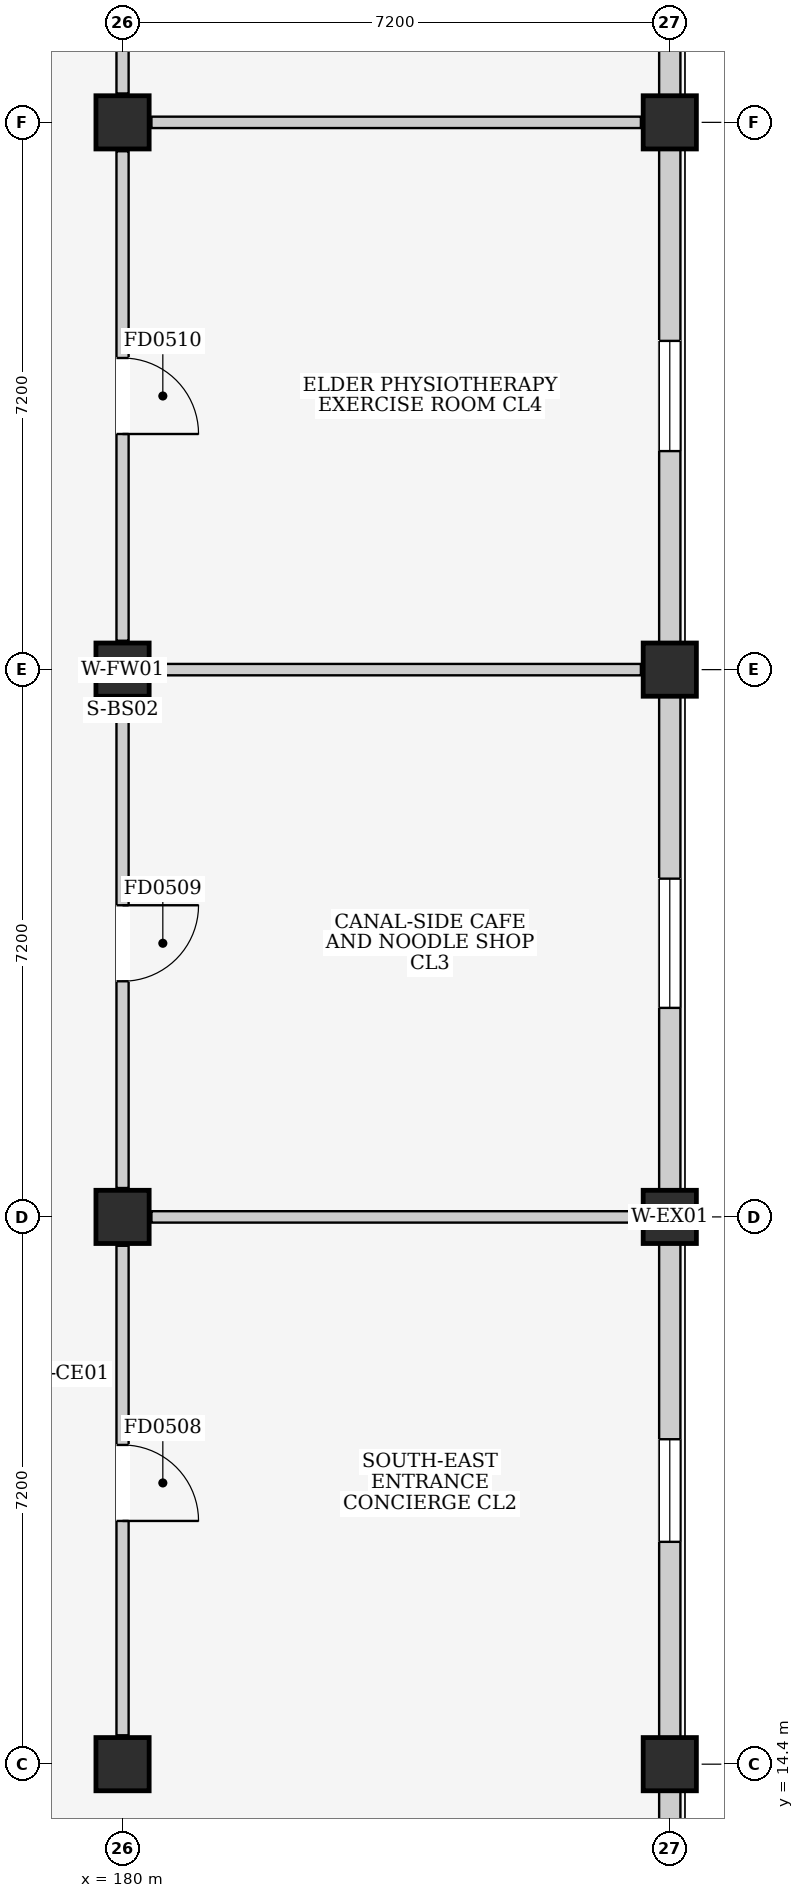
"""IFC4 building model, lengths in metres.
Left out: names, types, materials, properties, quantities, classifications, styles, units other than length and angle.
Written with IfcOpenShell. Run it as: python <this file> out.ifc"""

import sys

from ifc_helpers import new_model, si_unit, direction, frame, frame_2d, origin, origin_2d, place, context, subcontext, project, spatial, rectangle, extrude, element, fill, save


model = new_model("IFC4")
c1 = context("Model", 3, precision=1e-05, world=origin(), true_north=direction((0.0, 1.0)))
c2 = subcontext(c1, "Body", "Model", "MODEL_VIEW")
j1 = project(units=[si_unit("LENGTHUNIT", "METRE"), si_unit("PLANEANGLEUNIT", "RADIAN")], contexts=[c1])
p1 = place(None, origin())
s1 = spatial("IfcSite", under=j1, at=p1, CompositionType="ELEMENT")
p2 = place(p1, origin())
s2 = spatial("IfcBuilding", under=s1, at=p2, CompositionType="ELEMENT")
p3 = place(p2, origin())
s3 = spatial("IfcBuildingStorey", under=s2, at=p3, CompositionType="ELEMENT", Elevation=0.0)
for number, where, z_axis, x_axis in (
    (1, (180.0, 14.4, 0.0), (0.0, 0.0, 1.0), (1.0, 0.0, 0.0)),
    (2, (180.0, 21.6, 0.0), (0.0, 0.0, 1.0), (1.0, 0.0, 0.0)),
    (3, (180.0, 28.8, 0.0), (0.0, 0.0, 1.0), (1.0, 0.0, 0.0)),
    (4, (180.0, 36.0, 0.0), (0.0, 0.0, 1.0), (1.0, 0.0, 0.0)),
    (5, (187.2, 14.4, 0.0), (0.0, 0.0, 1.0), (1.0, 0.0, 0.0)),
    (6, (187.2, 21.6, 0.0), (0.0, 0.0, 1.0), (1.0, 0.0, 0.0)),
    (7, (187.2, 28.8, 0.0), (0.0, 0.0, 1.0), (1.0, 0.0, 0.0)),
    (8, (187.2, 36.0, 0.0), (0.0, 0.0, 1.0), (1.0, 0.0, 0.0)),
):
    element("IfcColumn", number, at=place(p3, frame(where, z_axis=z_axis, x_axis=x_axis)), inside=s3, PredefinedType="COLUMN", context=c2, shape_type="SweptSolid", body=[
        extrude(rectangle(XDim=0.7, YDim=0.7, at=origin_2d()), origin(), (0.0, 0.0, 1.0), 4.5),
    ])
p4 = place(p3, frame((187.2, 7.55, 0.0), z_axis=(0.0, 0.0, 1.0), x_axis=(0.0, 1.0, 0.0)))
e9 = element("IfcWall", 9, at=p4, inside=s3, PredefinedType="ELEMENTEDWALL", context=c2, shape_type="SweptSolid", body=[
    extrude(rectangle(XDim=6.5, YDim=0.28, at=frame_2d((3.25, 0.0))), origin(), (0.0, 0.0, 1.0), 3.665),
])
p5 = place(p4, frame((2.55, 0.0, 0.95)))
e10 = element("IfcOpeningElement", 10, at=p5, cuts=e9, PredefinedType="OPENING", context=c2, shape_type="SweptSolid", body=[
    extrude(rectangle(XDim=1.4, YDim=1.2, at=frame_2d((0.7, 0.6))), frame((0.0, 0.155, 0.0), z_axis=(0.0, -1.0, 0.0), x_axis=(1.0, 0.0, 0.0)), (0.0, 0.0, 1.0), 0.31),
])
p6 = place(p3, frame((187.2, 14.75, 0.0), z_axis=(0.0, 0.0, 1.0), x_axis=(0.0, 1.0, 0.0)))
e11 = element("IfcWall", 11, at=p6, inside=s3, PredefinedType="ELEMENTEDWALL", context=c2, shape_type="SweptSolid", body=[
    extrude(rectangle(XDim=6.5, YDim=0.28, at=frame_2d((3.25, 0.0))), origin(), (0.0, 0.0, 1.0), 3.665),
])
p7 = place(p6, frame((2.575, 0.0, 0.95)))
e12 = element("IfcOpeningElement", 12, at=p7, cuts=e11, PredefinedType="OPENING", context=c2, shape_type="SweptSolid", body=[
    extrude(rectangle(XDim=1.35, YDim=1.5, at=frame_2d((0.675, 0.75))), frame((0.0, 0.155, 0.0), z_axis=(0.0, -1.0, 0.0), x_axis=(1.0, 0.0, 0.0)), (0.0, 0.0, 1.0), 0.31),
])
p8 = place(p3, frame((187.2, 21.95, 0.0), z_axis=(0.0, 0.0, 1.0), x_axis=(0.0, 1.0, 0.0)))
e13 = element("IfcWall", 13, at=p8, inside=s3, PredefinedType="ELEMENTEDWALL", context=c2, shape_type="SweptSolid", body=[
    extrude(rectangle(XDim=6.5, YDim=0.28, at=frame_2d((3.25, 0.0))), origin(), (0.0, 0.0, 1.0), 3.665),
])
p9 = place(p8, frame((2.4, 0.0, 0.95)))
e14 = element("IfcOpeningElement", 14, at=p9, cuts=e13, PredefinedType="OPENING", context=c2, shape_type="SweptSolid", body=[
    extrude(rectangle(XDim=1.7, YDim=1.45, at=frame_2d((0.85, 0.725))), frame((0.0, 0.155, 0.0), z_axis=(0.0, -1.0, 0.0), x_axis=(1.0, 0.0, 0.0)), (0.0, 0.0, 1.0), 0.31),
])
p10 = place(p3, frame((187.2, 29.15, 0.0), z_axis=(0.0, 0.0, 1.0), x_axis=(0.0, 1.0, 0.0)))
e15 = element("IfcWall", 15, at=p10, inside=s3, PredefinedType="ELEMENTEDWALL", context=c2, shape_type="SweptSolid", body=[
    extrude(rectangle(XDim=6.5, YDim=0.28, at=frame_2d((3.25, 0.0))), origin(), (0.0, 0.0, 1.0), 3.665),
])
p11 = place(p10, frame((2.525, 0.0, 0.95)))
e16 = element("IfcOpeningElement", 16, at=p11, cuts=e15, PredefinedType="OPENING", context=c2, shape_type="SweptSolid", body=[
    extrude(rectangle(XDim=1.45, YDim=1.4, at=frame_2d((0.725, 0.7))), frame((0.0, 0.155, 0.0), z_axis=(0.0, -1.0, 0.0), x_axis=(1.0, 0.0, 0.0)), (0.0, 0.0, 1.0), 0.31),
])
p12 = place(p3, frame((187.2, 36.35, 0.0), z_axis=(0.0, 0.0, 1.0), x_axis=(0.0, 1.0, 0.0)))
e17 = element("IfcWall", 17, at=p12, inside=s3, PredefinedType="ELEMENTEDWALL", context=c2, shape_type="SweptSolid", body=[
    extrude(rectangle(XDim=6.5, YDim=0.28, at=frame_2d((3.25, 0.0))), origin(), (0.0, 0.0, 1.0), 3.665),
])
p13 = place(p12, frame((2.625, 0.0, 0.95)))
e18 = element("IfcOpeningElement", 18, at=p13, cuts=e17, PredefinedType="OPENING", context=c2, shape_type="SweptSolid", body=[
    extrude(rectangle(XDim=1.25, YDim=1.3, at=frame_2d((0.625, 0.65))), frame((0.0, 0.155, 0.0), z_axis=(0.0, -1.0, 0.0), x_axis=(1.0, 0.0, 0.0)), (0.0, 0.0, 1.0), 0.31),
])
p14 = place(p3, frame((180.0, 14.78, 0.0), z_axis=(0.0, 0.0, 1.0), x_axis=(0.0, 1.0, 0.0)))
e19 = element("IfcWall", 19, at=p14, inside=s3, PredefinedType="PARTITIONING", context=c2, shape_type="SweptSolid", body=[
    extrude(rectangle(XDim=6.44, YDim=0.16, at=frame_2d((3.22, 0.0))), origin(), (0.0, 0.0, 1.0), 3.435),
])
p15 = place(p14, frame((2.82, 0.0, 0.0)))
e20 = element("IfcOpeningElement", 20, at=p15, cuts=e19, PredefinedType="OPENING", context=c2, shape_type="SweptSolid", body=[
    extrude(rectangle(XDim=1.0, YDim=2.15, at=frame_2d((0.5, 1.075))), frame((0.0, 0.095, 0.0), z_axis=(0.0, -1.0, 0.0), x_axis=(1.0, 0.0, 0.0)), (0.0, 0.0, 1.0), 0.19),
])
p16 = place(p3, frame((180.38, 21.6, 0.0), z_axis=(0.0, 0.0, 1.0), x_axis=(1.0, 0.0, 0.0)))
e21 = element("IfcWall", 21, at=p16, inside=s3, PredefinedType="PARTITIONING", context=c2, shape_type="SweptSolid", body=[
    extrude(rectangle(XDim=6.44, YDim=0.15, at=frame_2d((3.22, 0.0))), origin(), (0.0, 0.0, 1.0), 3.435),
])
p17 = place(p3, frame((180.0, 21.98, 0.0), z_axis=(0.0, 0.0, 1.0), x_axis=(0.0, 1.0, 0.0)))
e22 = element("IfcWall", 22, at=p17, inside=s3, PredefinedType="PARTITIONING", context=c2, shape_type="SweptSolid", body=[
    extrude(rectangle(XDim=6.44, YDim=0.16, at=frame_2d((3.22, 0.0))), origin(), (0.0, 0.0, 1.0), 3.435),
])
p18 = place(p17, frame((2.72, 0.0, 0.0)))
e23 = element("IfcOpeningElement", 23, at=p18, cuts=e22, PredefinedType="OPENING", context=c2, shape_type="SweptSolid", body=[
    extrude(rectangle(XDim=1.0, YDim=2.15, at=frame_2d((0.5, 1.075))), frame((0.0, 0.095, 0.0), z_axis=(0.0, -1.0, 0.0), x_axis=(1.0, 0.0, 0.0)), (0.0, 0.0, 1.0), 0.19),
])
p19 = place(p3, frame((180.38, 28.8, 0.0), z_axis=(0.0, 0.0, 1.0), x_axis=(1.0, 0.0, 0.0)))
e24 = element("IfcWall", 24, at=p19, inside=s3, PredefinedType="PARTITIONING", context=c2, shape_type="SweptSolid", body=[
    extrude(rectangle(XDim=6.44, YDim=0.15, at=frame_2d((3.22, 0.0))), origin(), (0.0, 0.0, 1.0), 3.435),
])
p20 = place(p3, frame((180.0, 29.18, 0.0), z_axis=(0.0, 0.0, 1.0), x_axis=(0.0, 1.0, 0.0)))
e25 = element("IfcWall", 25, at=p20, inside=s3, PredefinedType="PARTITIONING", context=c2, shape_type="SweptSolid", body=[
    extrude(rectangle(XDim=6.44, YDim=0.16, at=frame_2d((3.22, 0.0))), origin(), (0.0, 0.0, 1.0), 3.435),
])
p21 = place(p20, frame((2.72, 0.0, 0.0)))
e26 = element("IfcOpeningElement", 26, at=p21, cuts=e25, PredefinedType="OPENING", context=c2, shape_type="SweptSolid", body=[
    extrude(rectangle(XDim=1.0, YDim=2.15, at=frame_2d((0.5, 1.075))), frame((0.0, 0.095, 0.0), z_axis=(0.0, -1.0, 0.0), x_axis=(1.0, 0.0, 0.0)), (0.0, 0.0, 1.0), 0.19),
])
p22 = place(p3, frame((180.38, 36.0, 0.0), z_axis=(0.0, 0.0, 1.0), x_axis=(1.0, 0.0, 0.0)))
e27 = element("IfcWall", 27, at=p22, inside=s3, PredefinedType="PARTITIONING", context=c2, shape_type="SweptSolid", body=[
    extrude(rectangle(XDim=6.44, YDim=0.15, at=frame_2d((3.22, 0.0))), origin(), (0.0, 0.0, 1.0), 3.435),
])
p23 = place(p3, frame((180.0, 36.38, 0.0), z_axis=(0.0, 0.0, 1.0), x_axis=(0.0, 1.0, 0.0)))
e28 = element("IfcWall", 28, at=p23, inside=s3, PredefinedType="PARTITIONING", context=c2, shape_type="SweptSolid", body=[
    extrude(rectangle(XDim=6.44, YDim=0.16, at=frame_2d((3.22, 0.0))), origin(), (0.0, 0.0, 1.0), 3.435),
])
p24 = place(p23, frame((2.62, 0.0, 0.0)))
e29 = element("IfcOpeningElement", 29, at=p24, cuts=e28, PredefinedType="OPENING", context=c2, shape_type="SweptSolid", body=[
    extrude(rectangle(XDim=1.0, YDim=2.15, at=frame_2d((0.5, 1.075))), frame((0.0, 0.095, 0.0), z_axis=(0.0, -1.0, 0.0), x_axis=(1.0, 0.0, 0.0)), (0.0, 0.0, 1.0), 0.19),
])
p25 = place(p7, origin())
e30 = element("IfcWindow", 30, at=p25, inside=s3, PartitioningType="SINGLE_PANEL", PredefinedType="WINDOW", context=c2, shape_type="SweptSolid", body=[
    extrude(rectangle(XDim=1.35, YDim=1.5, at=frame_2d((0.675, 0.75))), frame((0.0, 0.03, 0.0), z_axis=(0.0, -1.0, 0.0), x_axis=(1.0, 0.0, 0.0)), (0.0, 0.0, 1.0), 0.06),
])
fill(e12, e30)
p26 = place(p9, origin())
e31 = element("IfcWindow", 31, at=p26, inside=s3, PartitioningType="DOUBLE_PANEL_VERTICAL", PredefinedType="WINDOW", context=c2, shape_type="SweptSolid", body=[
    extrude(rectangle(XDim=1.7, YDim=1.45, at=frame_2d((0.85, 0.725))), frame((0.0, 0.03, 0.0), z_axis=(0.0, -1.0, 0.0), x_axis=(1.0, 0.0, 0.0)), (0.0, 0.0, 1.0), 0.06),
])
fill(e14, e31)
p27 = place(p11, origin())
e32 = element("IfcWindow", 32, at=p27, inside=s3, PartitioningType="DOUBLE_PANEL_VERTICAL", PredefinedType="WINDOW", context=c2, shape_type="SweptSolid", body=[
    extrude(rectangle(XDim=1.45, YDim=1.4, at=frame_2d((0.725, 0.7))), frame((0.0, 0.03, 0.0), z_axis=(0.0, -1.0, 0.0), x_axis=(1.0, 0.0, 0.0)), (0.0, 0.0, 1.0), 0.06),
])
fill(e16, e32)
p28 = place(p15, frame((1.0, 0.0, 0.0), z_axis=(0.0, 0.0, 1.0), x_axis=(-1.0, 0.0, 0.0)))
e33 = element("IfcDoor", 33, at=p28, inside=s3, OperationType="SINGLE_SWING_RIGHT", PredefinedType="DOOR", context=c2, shape_type="SweptSolid", body=[
    extrude(rectangle(XDim=1.0, YDim=2.15, at=frame_2d((0.5, 1.075))), frame((0.0, 0.025, 0.0), z_axis=(0.0, -1.0, 0.0), x_axis=(1.0, 0.0, 0.0)), (0.0, 0.0, 1.0), 0.05),
])
fill(e20, e33)
p29 = place(p18, frame((1.0, 0.0, 0.0), z_axis=(0.0, 0.0, 1.0), x_axis=(-1.0, 0.0, 0.0)))
e34 = element("IfcDoor", 34, at=p29, inside=s3, OperationType="SINGLE_SWING_LEFT", PredefinedType="DOOR", context=c2, shape_type="SweptSolid", body=[
    extrude(rectangle(XDim=1.0, YDim=2.15, at=frame_2d((0.5, 1.075))), frame((0.0, 0.025, 0.0), z_axis=(0.0, -1.0, 0.0), x_axis=(1.0, 0.0, 0.0)), (0.0, 0.0, 1.0), 0.05),
])
fill(e23, e34)
p30 = place(p21, frame((1.0, 0.0, 0.0), z_axis=(0.0, 0.0, 1.0), x_axis=(-1.0, 0.0, 0.0)))
e35 = element("IfcDoor", 35, at=p30, inside=s3, OperationType="SINGLE_SWING_RIGHT", PredefinedType="DOOR", context=c2, shape_type="SweptSolid", body=[
    extrude(rectangle(XDim=1.0, YDim=2.15, at=frame_2d((0.5, 1.075))), frame((0.0, 0.025, 0.0), z_axis=(0.0, -1.0, 0.0), x_axis=(1.0, 0.0, 0.0)), (0.0, 0.0, 1.0), 0.05),
])
fill(e26, e35)
save(model, sys.argv[1])
